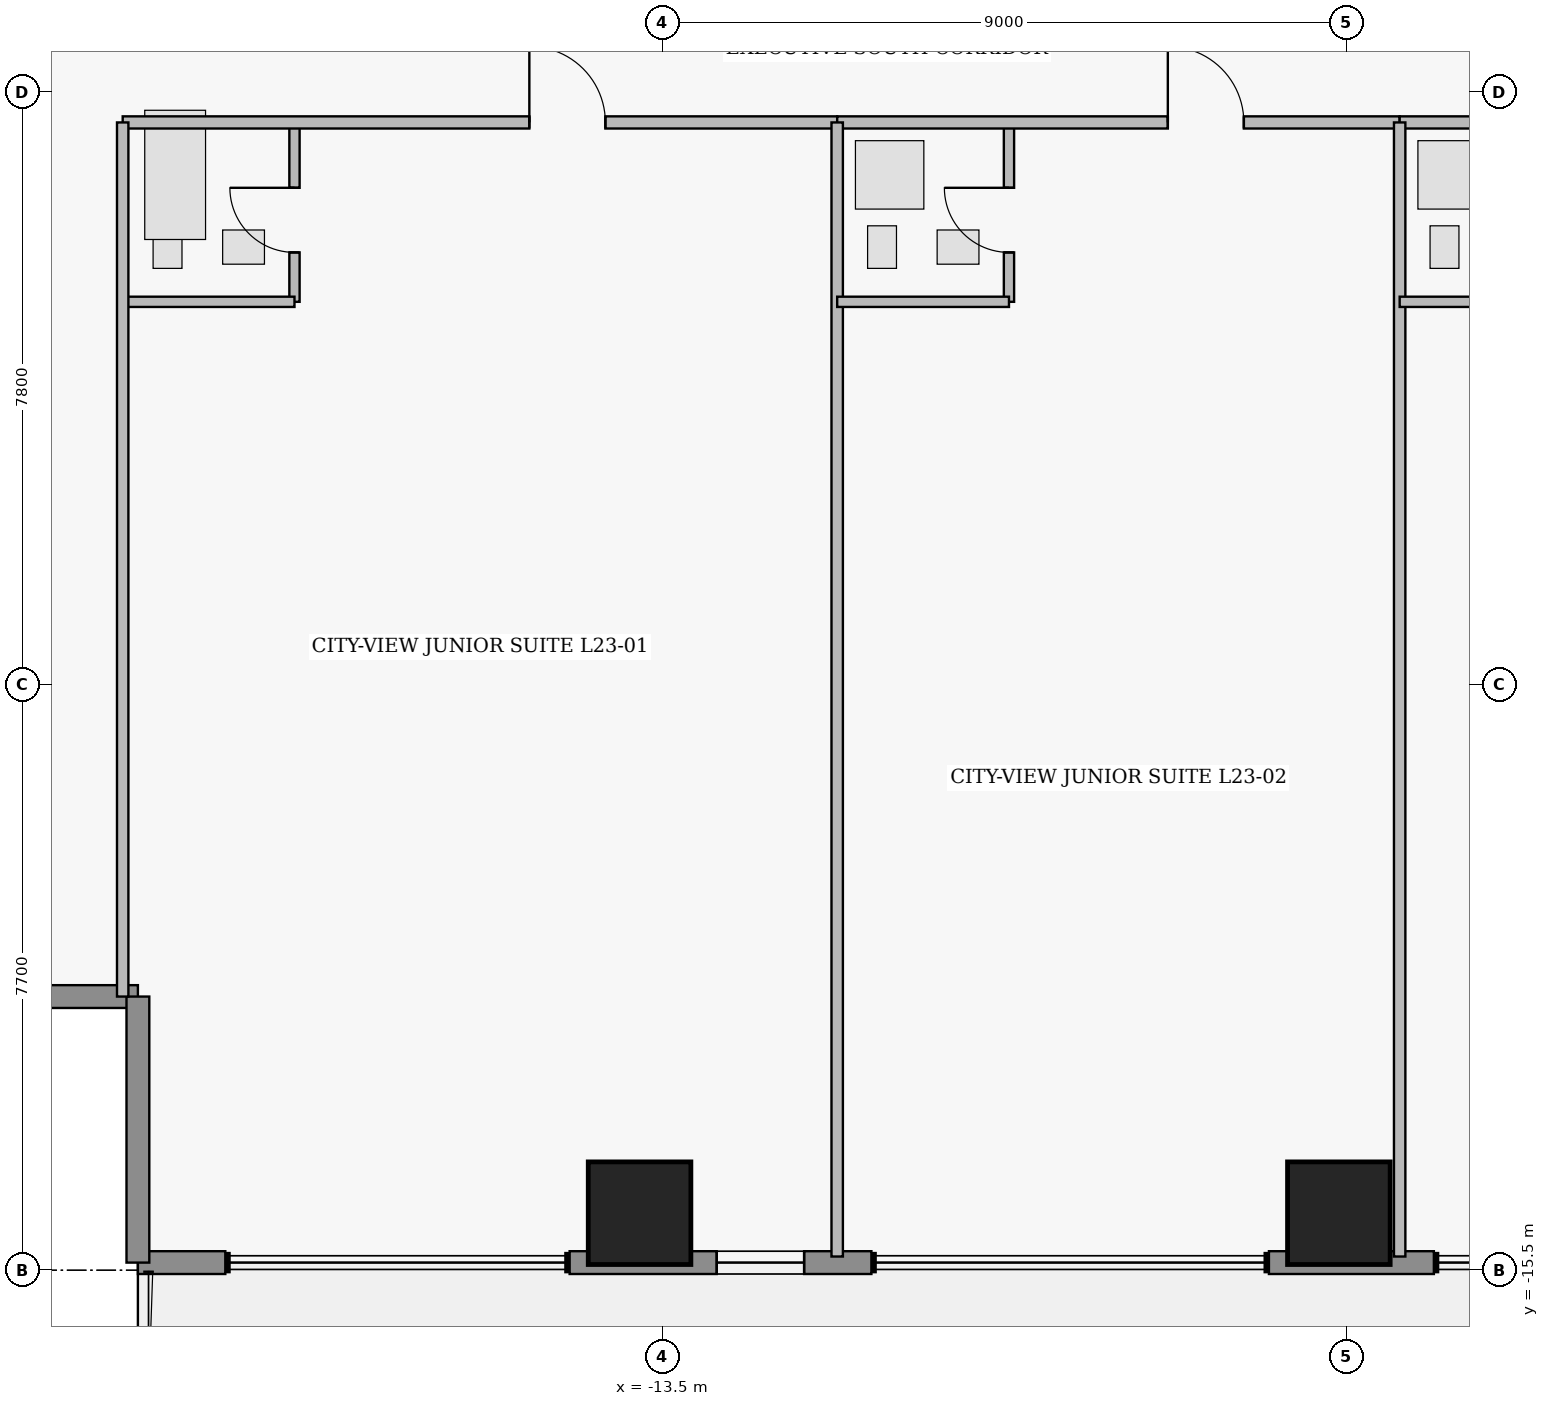
"""IFC4 building model, lengths in metres.
Left out: names, types, materials, properties, quantities, classifications, styles, units other than length and angle.
Written with IfcOpenShell. Run it as: python <this file> out.ifc"""

import sys

from ifc_helpers import new_model, si_unit, direction, frame, frame_2d, origin, origin_2d, place, context, subcontext, project, spatial, rectangle, extrude, element, fill, save


model = new_model("IFC4")
c1 = context("Model", 3, precision=1e-05, world=origin(), true_north=direction((0.0, 1.0)))
c2 = subcontext(c1, "Body", "Model", "MODEL_VIEW")
j1 = project(units=[si_unit("LENGTHUNIT", "METRE"), si_unit("PLANEANGLEUNIT", "RADIAN")], contexts=[c1])
p1 = place(None, origin())
s1 = spatial("IfcSite", under=j1, at=p1, CompositionType="ELEMENT")
p2 = place(p1, origin())
s2 = spatial("IfcBuilding", under=s1, at=p2, CompositionType="ELEMENT")
p3 = place(p2, frame((0.0, 0.0, 95.65)))
s3 = spatial("IfcBuildingStorey", under=s2, at=p3, CompositionType="ELEMENT", Elevation=95.65)
for number, where, z_axis, x_axis in (
    (1, (-13.8, -14.75, 0.43), (0.0, 0.0, 1.0), (1.0, 0.0, 0.0)),
    (2, (-4.6, -14.75, 0.43), (0.0, 0.0, 1.0), (1.0, 0.0, 0.0)),
):
    element("IfcColumn", number, at=place(p3, frame(where, z_axis=z_axis, x_axis=x_axis)), inside=s3, PredefinedType="COLUMN", context=c2, shape_type="SweptSolid", body=[
        extrude(rectangle(XDim=1.35, YDim=1.35, at=origin_2d()), origin(), (0.0, 0.0, 1.0), 3.22),
    ])
p4 = place(p3, frame((-20.4, -11.9, 0.0), z_axis=(0.0, 0.0, 1.0), x_axis=(-1.0, 0.0, 0.0)))
e3 = element("IfcWall", 3, at=p4, inside=s3, PredefinedType="STANDARD", context=c2, shape_type="SweptSolid", body=[
    extrude(rectangle(XDim=3.5, YDim=0.3, at=frame_2d((1.75, 0.0))), origin(), (0.0, 0.0, 1.0), 3.43),
])
p5 = place(p3, frame((-3.35, -15.4, 0.0), z_axis=(0.0, 0.0, 1.0), x_axis=(-1.0, 0.0, 0.0)))
e4 = element("IfcWall", 4, at=p5, inside=s3, PredefinedType="STANDARD", context=c2, shape_type="SweptSolid", body=[
    extrude(rectangle(XDim=2.17, YDim=0.3, at=frame_2d((1.085, 0.0))), origin(), (0.0, 0.0, 1.0), 3.43),
])
p6 = place(p3, frame((-10.75, -15.4, 0.0), z_axis=(0.0, 0.0, 1.0), x_axis=(-1.0, 0.0, 0.0)))
e5 = element("IfcWall", 5, at=p6, inside=s3, PredefinedType="STANDARD", context=c2, shape_type="SweptSolid", body=[
    extrude(rectangle(XDim=3.97, YDim=0.3, at=frame_2d((1.985, 0.0))), origin(), (0.0, 0.0, 1.0), 3.43),
])
p7 = place(p6, frame((0.885, 0.0, 0.95)))
e6 = element("IfcOpeningElement", 6, at=p7, cuts=e5, PredefinedType="OPENING", context=c2, shape_type="SweptSolid", body=[
    extrude(rectangle(XDim=1.15, YDim=1.55, at=frame_2d((0.575, 0.775))), frame((0.0, 0.16, 0.0), z_axis=(0.0, -1.0, 0.0), x_axis=(1.0, 0.0, 0.0)), (0.0, 0.0, 1.0), 0.32),
])
p8 = place(p3, frame((-19.25, -15.4, 0.0), z_axis=(0.0, 0.0, 1.0), x_axis=(-1.0, 0.0, 0.0)))
e7 = element("IfcWall", 7, at=p8, inside=s3, PredefinedType="STANDARD", context=c2, shape_type="SweptSolid", body=[
    extrude(rectangle(XDim=1.15, YDim=0.3, at=frame_2d((0.575, 0.0))), origin(), (0.0, 0.0, 1.0), 3.43),
])
p9 = place(p3, frame((-20.4, -15.4, 0.0), z_axis=(0.0, 0.0, 1.0), x_axis=(0.0, 1.0, 0.0)))
e8 = element("IfcWall", 8, at=p9, inside=s3, PredefinedType="STANDARD", context=c2, shape_type="SweptSolid", body=[
    extrude(rectangle(XDim=3.5, YDim=0.3, at=frame_2d((1.75, 0.0))), origin(), (0.0, 0.0, 1.0), 3.43),
])
p10 = place(p3, frame((-18.34, -2.76, 0.0), z_axis=(0.0, 0.0, 1.0), x_axis=(0.0, 1.0, 0.0)))
e9 = element("IfcWall", 9, at=p10, inside=s3, PredefinedType="PLUMBINGWALL", context=c2, shape_type="SweptSolid", body=[
    extrude(rectangle(XDim=2.36, YDim=0.135, at=frame_2d((1.18, 0.0))), origin(), (0.0, 0.0, 1.0), 3.43),
])
p11 = place(p10, frame((0.65, 0.0, 0.0)))
e10 = element("IfcOpeningElement", 10, at=p11, cuts=e9, PredefinedType="OPENING", context=c2, shape_type="SweptSolid", body=[
    extrude(rectangle(XDim=0.85, YDim=2.1, at=frame_2d((0.425, 1.05))), frame((0.0, 0.077, 0.0), z_axis=(0.0, -1.0, 0.0), x_axis=(1.0, 0.0, 0.0)), (0.0, 0.0, 1.0), 0.155),
])
p12 = place(p3, frame((-20.6, -0.4, 0.0), z_axis=(0.0, 0.0, 1.0), x_axis=(1.0, 0.0, 0.0)))
e11 = element("IfcWall", 11, at=p12, inside=s3, PredefinedType="PARTITIONING", context=c2, shape_type="SweptSolid", body=[
    extrude(rectangle(XDim=9.4, YDim=0.16, at=frame_2d((4.7, 0.0))), origin(), (0.0, 0.0, 1.0), 3.43),
])
p13 = place(p12, frame((5.35, 0.0, 0.0)))
e12 = element("IfcOpeningElement", 12, at=p13, cuts=e11, PredefinedType="OPENING", context=c2, shape_type="SweptSolid", body=[
    extrude(rectangle(XDim=1.0, YDim=2.15, at=frame_2d((0.5, 1.075))), frame((0.0, 0.09, 0.0), z_axis=(0.0, -1.0, 0.0), x_axis=(1.0, 0.0, 0.0)), (0.0, 0.0, 1.0), 0.18),
])
p14 = place(p3, frame((-8.94, -2.76, 0.0), z_axis=(0.0, 0.0, 1.0), x_axis=(0.0, 1.0, 0.0)))
e13 = element("IfcWall", 13, at=p14, inside=s3, PredefinedType="PLUMBINGWALL", context=c2, shape_type="SweptSolid", body=[
    extrude(rectangle(XDim=2.36, YDim=0.135, at=frame_2d((1.18, 0.0))), origin(), (0.0, 0.0, 1.0), 3.43),
])
p15 = place(p14, frame((0.65, 0.0, 0.0)))
e14 = element("IfcOpeningElement", 14, at=p15, cuts=e13, PredefinedType="OPENING", context=c2, shape_type="SweptSolid", body=[
    extrude(rectangle(XDim=0.85, YDim=2.1, at=frame_2d((0.425, 1.05))), frame((0.0, 0.077, 0.0), z_axis=(0.0, -1.0, 0.0), x_axis=(1.0, 0.0, 0.0)), (0.0, 0.0, 1.0), 0.155),
])
p16 = place(p3, frame((-11.2, -0.4, 0.0), z_axis=(0.0, 0.0, 1.0), x_axis=(1.0, 0.0, 0.0)))
e15 = element("IfcWall", 15, at=p16, inside=s3, PredefinedType="PARTITIONING", context=c2, shape_type="SweptSolid", body=[
    extrude(rectangle(XDim=7.4, YDim=0.16, at=frame_2d((3.7, 0.0))), origin(), (0.0, 0.0, 1.0), 3.43),
])
p17 = place(p16, frame((4.35, 0.0, 0.0)))
e16 = element("IfcOpeningElement", 16, at=p17, cuts=e15, PredefinedType="OPENING", context=c2, shape_type="SweptSolid", body=[
    extrude(rectangle(XDim=1.0, YDim=2.15, at=frame_2d((0.5, 1.075))), frame((0.0, 0.09, 0.0), z_axis=(0.0, -1.0, 0.0), x_axis=(1.0, 0.0, 0.0)), (0.0, 0.0, 1.0), 0.18),
])
p18 = place(p3, frame((-3.8, -0.4, 0.0), z_axis=(0.0, 0.0, 1.0), x_axis=(1.0, 0.0, 0.0)))
e17 = element("IfcWall", 17, at=p18, inside=s3, PredefinedType="PARTITIONING", context=c2, shape_type="SweptSolid", body=[
    extrude(rectangle(XDim=7.6, YDim=0.16, at=frame_2d((3.8, 0.0))), origin(), (0.0, 0.0, 1.0), 3.43),
])
p19 = place(p18, frame((4.45, 0.0, 0.0)))
e18 = element("IfcOpeningElement", 18, at=p19, cuts=e17, PredefinedType="OPENING", context=c2, shape_type="SweptSolid", body=[
    extrude(rectangle(XDim=1.0, YDim=2.15, at=frame_2d((0.5, 1.075))), frame((0.0, 0.09, 0.0), z_axis=(0.0, -1.0, 0.0), x_axis=(1.0, 0.0, 0.0)), (0.0, 0.0, 1.0), 0.18),
])
p20 = place(p3, frame((-20.6, -2.76, 0.0), z_axis=(0.0, 0.0, 1.0), x_axis=(1.0, 0.0, 0.0)))
e19 = element("IfcWall", 19, at=p20, inside=s3, PredefinedType="PLUMBINGWALL", context=c2, shape_type="SweptSolid", body=[
    extrude(rectangle(XDim=2.26, YDim=0.135, at=frame_2d((1.13, 0.0))), origin(), (0.0, 0.0, 1.0), 3.43),
])
p21 = place(p3, frame((-20.6, -11.9, 0.0), z_axis=(0.0, 0.0, 1.0), x_axis=(0.0, 1.0, 0.0)))
e20 = element("IfcWall", 20, at=p21, inside=s3, PredefinedType="PARTITIONING", context=c2, shape_type="SweptSolid", body=[
    extrude(rectangle(XDim=11.5, YDim=0.15, at=frame_2d((5.75, 0.0))), origin(), (0.0, 0.0, 1.0), 3.43),
])
p22 = place(p3, frame((-11.2, -15.32, 0.0), z_axis=(0.0, 0.0, 1.0), x_axis=(0.0, 1.0, 0.0)))
e21 = element("IfcWall", 21, at=p22, inside=s3, PredefinedType="PARTITIONING", context=c2, shape_type="SweptSolid", body=[
    extrude(rectangle(XDim=14.92, YDim=0.15, at=frame_2d((7.46, 0.0))), origin(), (0.0, 0.0, 1.0), 3.43),
])
p23 = place(p3, frame((-11.2, -2.76, 0.0), z_axis=(0.0, 0.0, 1.0), x_axis=(1.0, 0.0, 0.0)))
e22 = element("IfcWall", 22, at=p23, inside=s3, PredefinedType="PLUMBINGWALL", context=c2, shape_type="SweptSolid", body=[
    extrude(rectangle(XDim=2.26, YDim=0.135, at=frame_2d((1.13, 0.0))), origin(), (0.0, 0.0, 1.0), 3.43),
])
p24 = place(p3, frame((-3.8, -15.32, 0.0), z_axis=(0.0, 0.0, 1.0), x_axis=(0.0, 1.0, 0.0)))
e23 = element("IfcWall", 23, at=p24, inside=s3, PredefinedType="PARTITIONING", context=c2, shape_type="SweptSolid", body=[
    extrude(rectangle(XDim=14.92, YDim=0.15, at=frame_2d((7.46, 0.0))), origin(), (0.0, 0.0, 1.0), 3.43),
])
p25 = place(p3, frame((-3.8, -2.76, 0.0), z_axis=(0.0, 0.0, 1.0), x_axis=(1.0, 0.0, 0.0)))
e24 = element("IfcWall", 24, at=p25, inside=s3, PredefinedType="PLUMBINGWALL", context=c2, shape_type="SweptSolid", body=[
    extrude(rectangle(XDim=2.26, YDim=0.135, at=frame_2d((1.13, 0.0))), origin(), (0.0, 0.0, 1.0), 3.43),
])
p26 = place(p7, origin())
e25 = element("IfcWindow", 25, at=p26, inside=s3, PartitioningType="SINGLE_PANEL", PredefinedType="WINDOW", context=c2, shape_type="SweptSolid", body=[
    extrude(rectangle(XDim=1.15, YDim=1.55, at=frame_2d((0.575, 0.775))), frame((0.0, 0.03, 0.0), z_axis=(0.0, -1.0, 0.0), x_axis=(1.0, 0.0, 0.0)), (0.0, 0.0, 1.0), 0.06),
])
fill(e6, e25)
p27 = place(p11, origin())
e26 = element("IfcDoor", 26, at=p27, inside=s3, OperationType="SINGLE_SWING_RIGHT", PredefinedType="DOOR", context=c2, shape_type="SweptSolid", body=[
    extrude(rectangle(XDim=0.85, YDim=2.1, at=frame_2d((0.425, 1.05))), frame((0.0, 0.025, 0.0), z_axis=(0.0, -1.0, 0.0), x_axis=(1.0, 0.0, 0.0)), (0.0, 0.0, 1.0), 0.05),
])
fill(e10, e26)
p28 = place(p13, origin())
e27 = element("IfcDoor", 27, at=p28, inside=s3, OperationType="SINGLE_SWING_LEFT", PredefinedType="DOOR", context=c2, shape_type="SweptSolid", body=[
    extrude(rectangle(XDim=1.0, YDim=2.15, at=frame_2d((0.5, 1.075))), frame((0.0, 0.025, 0.0), z_axis=(0.0, -1.0, 0.0), x_axis=(1.0, 0.0, 0.0)), (0.0, 0.0, 1.0), 0.05),
])
fill(e12, e27)
p29 = place(p15, origin())
e28 = element("IfcDoor", 28, at=p29, inside=s3, OperationType="SINGLE_SWING_RIGHT", PredefinedType="DOOR", context=c2, shape_type="SweptSolid", body=[
    extrude(rectangle(XDim=0.85, YDim=2.1, at=frame_2d((0.425, 1.05))), frame((0.0, 0.025, 0.0), z_axis=(0.0, -1.0, 0.0), x_axis=(1.0, 0.0, 0.0)), (0.0, 0.0, 1.0), 0.05),
])
fill(e14, e28)
p30 = place(p17, origin())
e29 = element("IfcDoor", 29, at=p30, inside=s3, OperationType="SINGLE_SWING_LEFT", PredefinedType="DOOR", context=c2, shape_type="SweptSolid", body=[
    extrude(rectangle(XDim=1.0, YDim=2.15, at=frame_2d((0.5, 1.075))), frame((0.0, 0.025, 0.0), z_axis=(0.0, -1.0, 0.0), x_axis=(1.0, 0.0, 0.0)), (0.0, 0.0, 1.0), 0.05),
])
fill(e16, e29)
save(model, sys.argv[1])
